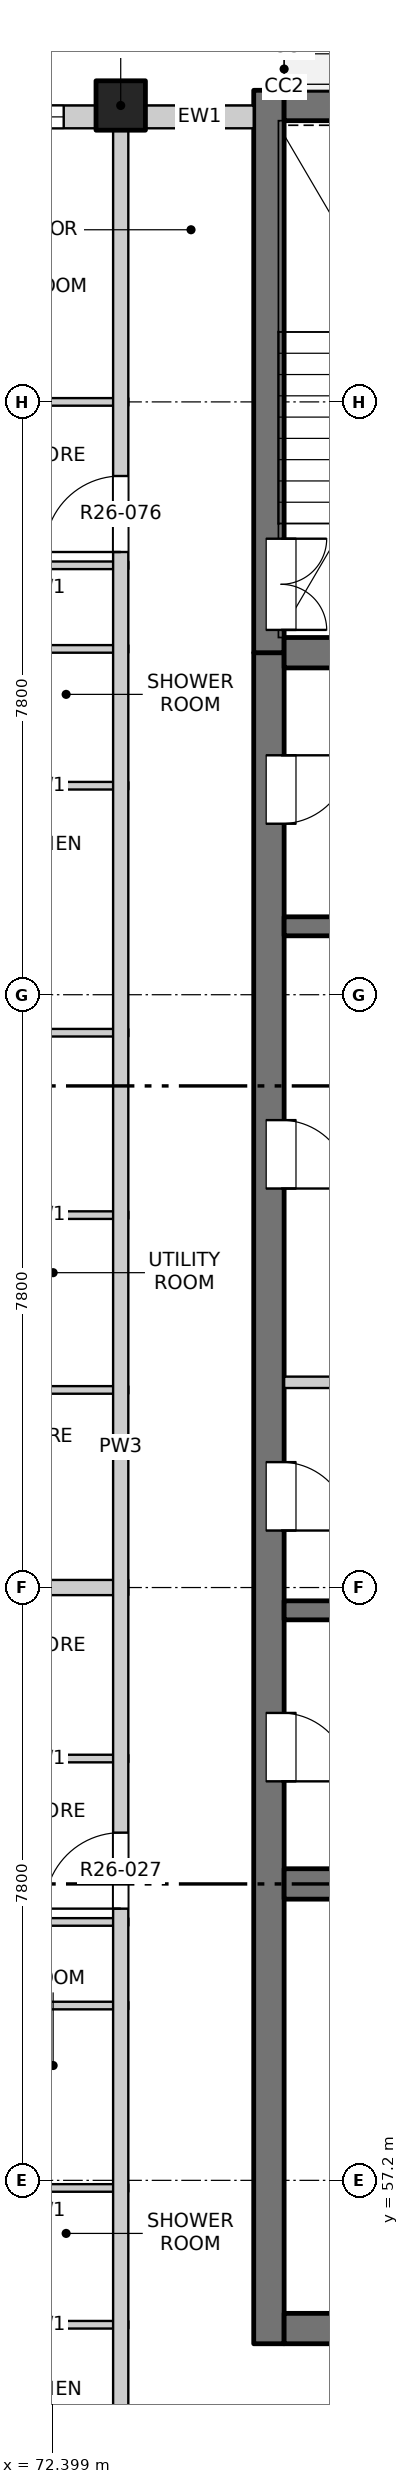
"""IFC4 building model, lengths in metres.
Left out: names, types, materials, properties, quantities, classifications, styles, units other than length and angle.
Written with IfcOpenShell. Run it as: python <this file> out.ifc"""

import sys

from ifc_helpers import new_model, si_unit, direction, frame, frame_2d, origin, origin_2d, place, context, subcontext, project, spatial, rectangle, extrude, element, fill, save


model = new_model("IFC4")
c1 = context("Model", 3, precision=1e-05, world=origin(), true_north=direction((0.0, 1.0)))
c2 = subcontext(c1, "Body", "Model", "MODEL_VIEW")
j1 = project(units=[si_unit("LENGTHUNIT", "METRE"), si_unit("PLANEANGLEUNIT", "RADIAN")], contexts=[c1])
p1 = place(None, origin())
s1 = spatial("IfcSite", under=j1, at=p1, CompositionType="ELEMENT")
p2 = place(p1, origin())
s2 = spatial("IfcBuilding", under=s1, at=p2, CompositionType="ELEMENT")
p3 = place(p2, frame((0.0, 0.0, 259.6)))
s3 = spatial("IfcBuildingStorey", under=s2, at=p3, CompositionType="ELEMENT", Elevation=259.6)
p4 = place(p3, frame((73.3, 84.5, -0.25), z_axis=(0.0, 0.0, 1.0), x_axis=(1.0, 0.0, 0.0)))
e1 = element("IfcColumn", 1, at=p4, inside=s3, PredefinedType="COLUMN", context=c2, shape_type="SweptSolid", body=[
    extrude(rectangle(XDim=0.65, YDim=0.65, at=origin_2d()), origin(), (0.0, 0.0, 1.0), 3.4),
])
p5 = place(p3, frame((75.25, 55.05, -0.25), z_axis=(0.0, 0.0, 1.0), x_axis=(0.0, 1.0, 0.0)))
e2 = element("IfcWall", 2, at=p5, inside=s3, PredefinedType="SOLIDWALL", context=c2, shape_type="SweptSolid", body=[
    extrude(rectangle(XDim=22.25, YDim=0.4, at=frame_2d((11.125, 0.0))), origin(), (0.0, 0.0, 1.0), 3.4),
])
p6 = place(p5, frame((7.4, 0.0, 0.25)))
e3 = element("IfcOpeningElement", 3, at=p6, cuts=e2, PredefinedType="OPENING", context=c2, shape_type="SweptSolid", body=[
    extrude(rectangle(XDim=0.9, YDim=2.1, at=frame_2d((0.45, 1.05))), frame((0.0, 0.21, 0.0), z_axis=(0.0, -1.0, 0.0), x_axis=(1.0, 0.0, 0.0)), (0.0, 0.0, 1.0), 0.42),
])
p7 = place(p5, frame((10.7, 0.0, 0.25)))
e4 = element("IfcOpeningElement", 4, at=p7, cuts=e2, PredefinedType="OPENING", context=c2, shape_type="SweptSolid", body=[
    extrude(rectangle(XDim=0.9, YDim=2.1, at=frame_2d((0.45, 1.05))), frame((0.0, 0.21, 0.0), z_axis=(0.0, -1.0, 0.0), x_axis=(1.0, 0.0, 0.0)), (0.0, 0.0, 1.0), 0.42),
])
p8 = place(p5, frame((15.2, 0.0, 0.25)))
e5 = element("IfcOpeningElement", 5, at=p8, cuts=e2, PredefinedType="OPENING", context=c2, shape_type="SweptSolid", body=[
    extrude(rectangle(XDim=0.9, YDim=2.1, at=frame_2d((0.45, 1.05))), frame((0.0, 0.21, 0.0), z_axis=(0.0, -1.0, 0.0), x_axis=(1.0, 0.0, 0.0)), (0.0, 0.0, 1.0), 0.42),
])
p9 = place(p5, frame((20.0, 0.0, 0.25)))
e6 = element("IfcOpeningElement", 6, at=p9, cuts=e2, PredefinedType="OPENING", context=c2, shape_type="SweptSolid", body=[
    extrude(rectangle(XDim=0.9, YDim=2.1, at=frame_2d((0.45, 1.05))), frame((0.0, 0.21, 0.0), z_axis=(0.0, -1.0, 0.0), x_axis=(1.0, 0.0, 0.0)), (0.0, 0.0, 1.0), 0.42),
])
p10 = place(p3, frame((75.25, 77.3, -0.25), z_axis=(0.0, 0.0, 1.0), x_axis=(0.0, 1.0, 0.0)))
e7 = element("IfcWall", 7, at=p10, inside=s3, PredefinedType="SOLIDWALL", context=c2, shape_type="SweptSolid", body=[
    extrude(rectangle(XDim=7.4, YDim=0.4, at=frame_2d((3.7, 0.0))), origin(), (0.0, 0.0, 1.0), 3.4),
])
p11 = place(p10, frame((0.3, 0.0, 0.25)))
e8 = element("IfcOpeningElement", 8, at=p11, cuts=e7, PredefinedType="OPENING", context=c2, shape_type="SweptSolid", body=[
    extrude(rectangle(XDim=1.2, YDim=2.1, at=frame_2d((0.6, 1.05))), frame((0.0, 0.21, 0.0), z_axis=(0.0, -1.0, 0.0), x_axis=(1.0, 0.0, 0.0)), (0.0, 0.0, 1.0), 0.42),
])
p12 = place(p3, frame((75.45, 55.25, -0.25), z_axis=(0.0, 0.0, 1.0), x_axis=(1.0, 0.0, 0.0)))
e9 = element("IfcWall", 9, at=p12, inside=s3, PredefinedType="SOLIDWALL", context=c2, shape_type="SweptSolid", body=[
    extrude(rectangle(XDim=19.1, YDim=0.4, at=frame_2d((9.55, 0.0))), origin(), (0.0, 0.0, 1.0), 3.4),
])
p13 = place(p12, frame((8.8, 0.0, 0.25)))
e10 = element("IfcOpeningElement", 10, at=p13, cuts=e9, PredefinedType="OPENING", context=c2, shape_type="SweptSolid", body=[
    extrude(rectangle(XDim=1.5, YDim=2.1, at=frame_2d((0.75, 1.05))), frame((0.0, 0.21, 0.0), z_axis=(0.0, -1.0, 0.0), x_axis=(1.0, 0.0, 0.0)), (0.0, 0.0, 1.0), 0.42),
])
p14 = place(p3, frame((75.45, 84.5, -0.25), z_axis=(0.0, 0.0, 1.0), x_axis=(1.0, 0.0, 0.0)))
e11 = element("IfcWall", 11, at=p14, inside=s3, PredefinedType="SOLIDWALL", context=c2, shape_type="SweptSolid", body=[
    extrude(rectangle(XDim=19.1, YDim=0.4, at=frame_2d((9.55, 0.0))), origin(), (0.0, 0.0, 1.0), 3.4),
])
p15 = place(p3, frame((75.45, 61.1, -0.25), z_axis=(0.0, 0.0, 1.0), x_axis=(1.0, 0.0, 0.0)))
e12 = element("IfcWall", 12, at=p15, inside=s3, PredefinedType="SOLIDWALL", context=c2, shape_type="SweptSolid", body=[
    extrude(rectangle(XDim=3.875, YDim=0.4, at=frame_2d((1.938, 0.0))), origin(), (0.0, 0.0, 1.0), 3.4),
])
for number, where, z_axis, x_axis in (
    (13, (75.45, 64.7, -0.25), (0.0, 0.0, 1.0), (1.0, 0.0, 0.0)),
    (14, (75.45, 73.7, -0.25), (0.0, 0.0, 1.0), (1.0, 0.0, 0.0)),
):
    element("IfcWall", number, at=place(p3, frame(where, z_axis=z_axis, x_axis=x_axis)), inside=s3, PredefinedType="SOLIDWALL", context=c2, shape_type="SweptSolid", body=[
        extrude(rectangle(XDim=3.875, YDim=0.25, at=frame_2d((1.938, 0.0))), origin(), (0.0, 0.0, 1.0), 3.4),
    ])
p16 = place(p3, frame((75.45, 77.3, -0.25), z_axis=(0.0, 0.0, 1.0), x_axis=(1.0, 0.0, 0.0)))
e15 = element("IfcWall", 15, at=p16, inside=s3, PredefinedType="SOLIDWALL", context=c2, shape_type="SweptSolid", body=[
    extrude(rectangle(XDim=3.875, YDim=0.4, at=frame_2d((1.938, 0.0))), origin(), (0.0, 0.0, 1.0), 3.4),
])
p17 = place(p3, frame((69.4, 84.35, 0.0), z_axis=(0.0, 0.0, 1.0), x_axis=(1.0, 0.0, 0.0)))
e16 = element("IfcWall", 16, at=p17, inside=s3, PredefinedType="SOLIDWALL", context=c2, shape_type="SweptSolid", body=[
    extrude(rectangle(XDim=3.575, YDim=0.3, at=frame_2d((1.788, 0.0))), origin(), (0.0, 0.0, 1.0), 3.15),
])
p18 = place(p17, frame((0.75, 0.0, 0.9)))
e17 = element("IfcOpeningElement", 17, at=p18, cuts=e16, PredefinedType="OPENING", context=c2, shape_type="SweptSolid", body=[
    extrude(rectangle(XDim=2.4, YDim=1.8, at=frame_2d((1.2, 0.9))), frame((0.0, 0.16, 0.0), z_axis=(0.0, -1.0, 0.0), x_axis=(1.0, 0.0, 0.0)), (0.0, 0.0, 1.0), 0.32),
])
p19 = place(p3, frame((73.625, 84.35, 0.0), z_axis=(0.0, 0.0, 1.0), x_axis=(1.0, 0.0, 0.0)))
e18 = element("IfcWall", 18, at=p19, inside=s3, PredefinedType="SOLIDWALL", context=c2, shape_type="SweptSolid", body=[
    extrude(rectangle(XDim=1.425, YDim=0.3, at=frame_2d((0.712, 0.0))), origin(), (0.0, 0.0, 1.0), 3.15),
])
for number, where, z_axis, x_axis in (
    (19, (71.18, 55.3, 0.0), (0.0, 0.0, 1.0), (1.0, 0.0, 0.0)),
    (20, (71.18, 57.1, 0.0), (0.0, 0.0, 1.0), (1.0, 0.0, 0.0)),
    (21, (71.18, 59.5, 0.0), (0.0, 0.0, 1.0), (1.0, 0.0, 0.0)),
    (22, (71.18, 60.6, 0.0), (0.0, 0.0, 1.0), (1.0, 0.0, 0.0)),
    (23, (71.18, 62.75, 0.0), (0.0, 0.0, 1.0), (1.0, 0.0, 0.0)),
):
    element("IfcWall", number, at=place(p3, frame(where, z_axis=z_axis, x_axis=x_axis)), inside=s3, PredefinedType="PARTITIONING", context=c2, shape_type="SweptSolid", body=[
        extrude(rectangle(XDim=2.22, YDim=0.1, at=frame_2d((1.11, 0.0))), origin(), (0.0, 0.0, 1.0), 3.15),
    ])
p20 = place(p3, frame((65.8, 65.0, 0.0), z_axis=(0.0, 0.0, 1.0), x_axis=(1.0, 0.0, 0.0)))
e24 = element("IfcWall", 24, at=p20, inside=s3, PredefinedType="PARTITIONING", context=c2, shape_type="SweptSolid", body=[
    extrude(rectangle(XDim=7.6, YDim=0.2, at=frame_2d((3.8, 0.0))), origin(), (0.0, 0.0, 1.0), 3.15),
])
p21 = place(p3, frame((71.18, 67.6, 0.0), z_axis=(0.0, 0.0, 1.0), x_axis=(1.0, 0.0, 0.0)))
e25 = element("IfcWall", 25, at=p21, inside=s3, PredefinedType="PARTITIONING", context=c2, shape_type="SweptSolid", body=[
    extrude(rectangle(XDim=2.22, YDim=0.1, at=frame_2d((1.11, 0.0))), origin(), (0.0, 0.0, 1.0), 3.15),
])
p22 = place(p3, frame((75.45, 67.7, 0.0), z_axis=(0.0, 0.0, 1.0), x_axis=(1.0, 0.0, 0.0)))
e26 = element("IfcWall", 26, at=p22, inside=s3, PredefinedType="PARTITIONING", context=c2, shape_type="SweptSolid", body=[
    extrude(rectangle(XDim=3.875, YDim=0.15, at=frame_2d((1.938, 0.0))), origin(), (0.0, 0.0, 1.0), 3.15),
])
for number, where, z_axis, x_axis in (
    (27, (71.18, 69.9, 0.0), (0.0, 0.0, 1.0), (1.0, 0.0, 0.0)),
    (28, (71.18, 72.3, 0.0), (0.0, 0.0, 1.0), (1.0, 0.0, 0.0)),
    (29, (71.18, 75.55, 0.0), (0.0, 0.0, 1.0), (1.0, 0.0, 0.0)),
    (30, (71.18, 77.35, 0.0), (0.0, 0.0, 1.0), (1.0, 0.0, 0.0)),
    (31, (71.18, 78.45, 0.0), (0.0, 0.0, 1.0), (1.0, 0.0, 0.0)),
):
    element("IfcWall", number, at=place(p3, frame(where, z_axis=z_axis, x_axis=x_axis)), inside=s3, PredefinedType="PARTITIONING", context=c2, shape_type="SweptSolid", body=[
        extrude(rectangle(XDim=2.22, YDim=0.1, at=frame_2d((1.11, 0.0))), origin(), (0.0, 0.0, 1.0), 3.15),
    ])
p23 = place(p3, frame((65.8, 80.6, 0.0), z_axis=(0.0, 0.0, 1.0), x_axis=(1.0, 0.0, 0.0)))
e32 = element("IfcWall", 32, at=p23, inside=s3, PredefinedType="PARTITIONING", context=c2, shape_type="SweptSolid", body=[
    extrude(rectangle(XDim=7.6, YDim=0.1, at=frame_2d((3.8, 0.0))), origin(), (0.0, 0.0, 1.0), 3.15),
])
p24 = place(p23, frame((4.09, 0.0, 0.0)))
e33 = element("IfcOpeningElement", 33, at=p24, cuts=e32, PredefinedType="OPENING", context=c2, shape_type="SweptSolid", body=[
    extrude(rectangle(XDim=0.9, YDim=2.1, at=frame_2d((0.45, 1.05))), frame((0.0, 0.06, 0.0), z_axis=(0.0, -1.0, 0.0), x_axis=(1.0, 0.0, 0.0)), (0.0, 0.0, 1.0), 0.12),
])
p25 = place(p3, frame((73.3, 49.5, 0.0), z_axis=(0.0, 0.0, 1.0), x_axis=(0.0, 1.0, 0.0)))
e34 = element("IfcWall", 34, at=p25, inside=s3, PredefinedType="PARTITIONING", context=c2, shape_type="SweptSolid", body=[
    extrude(rectangle(XDim=34.7, YDim=0.2, at=frame_2d((17.35, 0.0))), origin(), (0.0, 0.0, 1.0), 3.15),
])
p26 = place(p25, frame((11.275, 0.0, 0.0)))
e35 = element("IfcOpeningElement", 35, at=p26, cuts=e34, PredefinedType="OPENING", context=c2, shape_type="SweptSolid", body=[
    extrude(rectangle(XDim=1.0, YDim=2.1, at=frame_2d((0.5, 1.05))), frame((0.0, 0.11, 0.0), z_axis=(0.0, -1.0, 0.0), x_axis=(1.0, 0.0, 0.0)), (0.0, 0.0, 1.0), 0.22),
])
p27 = place(p25, frame((29.125, 0.0, 0.0)))
e36 = element("IfcOpeningElement", 36, at=p27, cuts=e34, PredefinedType="OPENING", context=c2, shape_type="SweptSolid", body=[
    extrude(rectangle(XDim=1.0, YDim=2.1, at=frame_2d((0.5, 1.05))), frame((0.0, 0.11, 0.0), z_axis=(0.0, -1.0, 0.0), x_axis=(1.0, 0.0, 0.0)), (0.0, 0.0, 1.0), 0.22),
])
p28 = place(p18, origin())
e37 = element("IfcWindow", 37, at=p28, inside=s3, PartitioningType="DOUBLE_PANEL_VERTICAL", PredefinedType="WINDOW", context=c2, shape_type="SweptSolid", body=[
    extrude(rectangle(XDim=2.4, YDim=1.8, at=frame_2d((1.2, 0.9))), frame((0.0, 0.03, 0.0), z_axis=(0.0, -1.0, 0.0), x_axis=(1.0, 0.0, 0.0)), (0.0, 0.0, 1.0), 0.06),
])
fill(e17, e37)
p29 = place(p26, origin())
e38 = element("IfcDoor", 38, at=p29, inside=s3, OperationType="SINGLE_SWING_RIGHT", PredefinedType="DOOR", context=c2, shape_type="SweptSolid", body=[
    extrude(rectangle(XDim=1.0, YDim=2.1, at=frame_2d((0.5, 1.05))), frame((0.0, 0.025, 0.0), z_axis=(0.0, -1.0, 0.0), x_axis=(1.0, 0.0, 0.0)), (0.0, 0.0, 1.0), 0.05),
])
fill(e35, e38)
p30 = place(p6, origin())
e39 = element("IfcDoor", 39, at=p30, inside=s3, OperationType="SINGLE_SWING_RIGHT", PredefinedType="DOOR", context=c2, shape_type="SweptSolid", body=[
    extrude(rectangle(XDim=0.9, YDim=2.1, at=frame_2d((0.45, 1.05))), frame((0.0, -0.135, 0.0), z_axis=(0.0, -1.0, 0.0), x_axis=(1.0, 0.0, 0.0)), (0.0, 0.0, 1.0), 0.05),
])
fill(e3, e39)
p31 = place(p7, origin())
e40 = element("IfcDoor", 40, at=p31, inside=s3, OperationType="SINGLE_SWING_RIGHT", PredefinedType="DOOR", context=c2, shape_type="SweptSolid", body=[
    extrude(rectangle(XDim=0.9, YDim=2.1, at=frame_2d((0.45, 1.05))), frame((0.0, -0.135, 0.0), z_axis=(0.0, -1.0, 0.0), x_axis=(1.0, 0.0, 0.0)), (0.0, 0.0, 1.0), 0.05),
])
fill(e4, e40)
p32 = place(p8, origin())
e41 = element("IfcDoor", 41, at=p32, inside=s3, OperationType="SINGLE_SWING_RIGHT", PredefinedType="DOOR", context=c2, shape_type="SweptSolid", body=[
    extrude(rectangle(XDim=0.9, YDim=2.1, at=frame_2d((0.45, 1.05))), frame((0.0, -0.135, 0.0), z_axis=(0.0, -1.0, 0.0), x_axis=(1.0, 0.0, 0.0)), (0.0, 0.0, 1.0), 0.05),
])
fill(e5, e41)
p33 = place(p9, origin())
e42 = element("IfcDoor", 42, at=p33, inside=s3, OperationType="SINGLE_SWING_LEFT", PredefinedType="DOOR", context=c2, shape_type="SweptSolid", body=[
    extrude(rectangle(XDim=0.9, YDim=2.1, at=frame_2d((0.45, 1.05))), frame((0.0, -0.135, 0.0), z_axis=(0.0, -1.0, 0.0), x_axis=(1.0, 0.0, 0.0)), (0.0, 0.0, 1.0), 0.05),
])
fill(e6, e42)
p34 = place(p11, origin())
e43 = element("IfcDoor", 43, at=p34, inside=s3, OperationType="DOUBLE_DOOR_SINGLE_SWING", PredefinedType="DOOR", context=c2, shape_type="SweptSolid", body=[
    extrude(rectangle(XDim=1.2, YDim=2.1, at=frame_2d((0.6, 1.05))), frame((0.0, -0.135, 0.0), z_axis=(0.0, -1.0, 0.0), x_axis=(1.0, 0.0, 0.0)), (0.0, 0.0, 1.0), 0.05),
])
fill(e8, e43)
p35 = place(p27, origin())
e44 = element("IfcDoor", 44, at=p35, inside=s3, OperationType="SINGLE_SWING_RIGHT", PredefinedType="DOOR", context=c2, shape_type="SweptSolid", body=[
    extrude(rectangle(XDim=1.0, YDim=2.1, at=frame_2d((0.5, 1.05))), frame((0.0, 0.025, 0.0), z_axis=(0.0, -1.0, 0.0), x_axis=(1.0, 0.0, 0.0)), (0.0, 0.0, 1.0), 0.05),
])
fill(e36, e44)
save(model, sys.argv[1])
